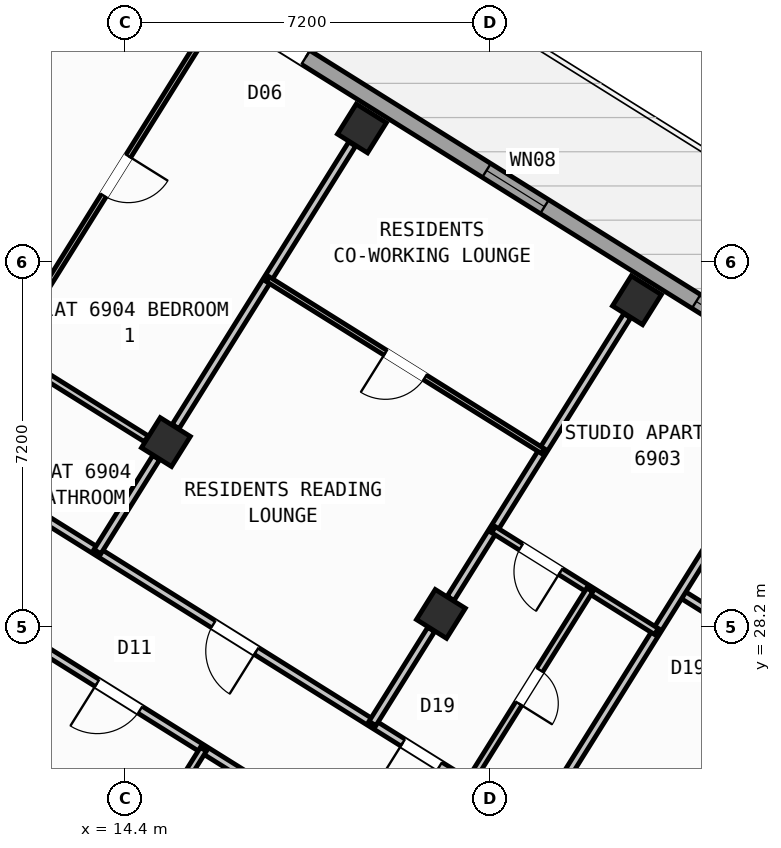
"""IFC4 building model, lengths in metres.
Left out: names, types, materials, properties, quantities, classifications, styles, units other than length and angle.
Written with IfcOpenShell. Run it as: python <this file> out.ifc"""

import sys

from ifc_helpers import new_model, si_unit, direction, frame, frame_2d, origin, origin_2d, place, context, subcontext, project, spatial, rectangle, hollow_rectangle, extrude, source, transform, mapped, element, fill, save


model = new_model("IFC4")
c1 = context("Model", 3, precision=1e-05, world=origin(), true_north=direction((0.0, 1.0)))
c2 = subcontext(c1, "Body", "Model", "MODEL_VIEW")
j1 = project(units=[si_unit("LENGTHUNIT", "METRE"), si_unit("PLANEANGLEUNIT", "RADIAN")], contexts=[c1])
p1 = place(None, origin())
s1 = spatial("IfcSite", under=j1, at=p1, CompositionType="ELEMENT")
p2 = place(p1, origin())
s2 = spatial("IfcBuilding", under=s1, at=p2, CompositionType="ELEMENT")
p3 = place(p2, frame((0.0, 0.0, 273.6)))
s3 = spatial("IfcBuildingStorey", under=s2, at=p3, CompositionType="ELEMENT", Elevation=273.6)
m1 = source(origin(), c2, "Body", "SweptSolid", [
    extrude(hollow_rectangle(XDim=0.7, YDim=0.7, WallThickness=0.028, at=origin_2d()), origin(), (0.0, 0.0, 1.0), 3.6),
])
for number, where, z_axis, x_axis in (
    (1, (24.5, 34.643, 0.0), (0.0, 0.0, 1.0), (-0.848, 0.53, 0.0)),
    (2, (20.632, 28.452, 0.0), (0.0, 0.0, 1.0), (-0.848, 0.53, 0.0)),
    (3, (19.073, 38.034, 0.0), (0.0, 0.0, 1.0), (-0.848, 0.53, 0.0)),
    (4, (15.205, 31.844, 0.0), (0.0, 0.0, 1.0), (-0.848, 0.53, 0.0)),
):
    element("IfcColumn", number, at=place(p3, frame(where, z_axis=z_axis, x_axis=x_axis)), inside=s3, PredefinedType="COLUMN", context=c2, shape_type="MappedRepresentation", body=[
        mapped(m1, transform((0.0, 0.0, 0.0), scale=1.0)),
    ])
p4 = place(p3, frame((2.415, 23.452, 0.0), z_axis=(0.0, 0.0, 1.0), x_axis=(0.52991049553, 0.848053575387, 0.0)))
e5 = element("IfcWall", 5, at=p4, inside=s3, PredefinedType="STANDARD", context=c2, shape_type="SweptSolid", body=[
    extrude(rectangle(XDim=21.587, YDim=0.32, at=frame_2d((10.794, 0.0))), origin(), (0.0, 0.0, 1.0), 2.875),
])
p5 = place(p4, frame((2.606, 0.0, 0.9)))
e6 = element("IfcOpeningElement", 6, at=p5, cuts=e5, PredefinedType="OPENING", context=c2, shape_type="SweptSolid", body=[
    extrude(rectangle(XDim=1.65, YDim=1.45, at=frame_2d((0.825, 0.725))), frame((0.0, 0.17, 0.0), z_axis=(0.0, -1.0, 0.0), x_axis=(1.0, 0.0, 0.0)), (0.0, 0.0, 1.0), 0.34),
])
p6 = place(p4, frame((7.504, 0.0, 1.0)))
e7 = element("IfcOpeningElement", 7, at=p6, cuts=e5, PredefinedType="OPENING", context=c2, shape_type="SweptSolid", body=[
    extrude(rectangle(XDim=0.9, YDim=1.25, at=frame_2d((0.45, 0.625))), frame((0.0, 0.17, 0.0), z_axis=(0.0, -1.0, 0.0), x_axis=(1.0, 0.0, 0.0)), (0.0, 0.0, 1.0), 0.34),
])
p7 = place(p4, frame((12.084, 0.0, 1.0)))
e8 = element("IfcOpeningElement", 8, at=p7, cuts=e5, PredefinedType="OPENING", context=c2, shape_type="SweptSolid", body=[
    extrude(rectangle(XDim=0.9, YDim=1.25, at=frame_2d((0.45, 0.625))), frame((0.0, 0.17, 0.0), z_axis=(0.0, -1.0, 0.0), x_axis=(1.0, 0.0, 0.0)), (0.0, 0.0, 1.0), 0.34),
])
p8 = place(p4, frame((15.619, 0.0, 1.0)))
e9 = element("IfcOpeningElement", 9, at=p8, cuts=e5, PredefinedType="OPENING", context=c2, shape_type="SweptSolid", body=[
    extrude(rectangle(XDim=0.9, YDim=1.25, at=frame_2d((0.45, 0.625))), frame((0.0, 0.17, 0.0), z_axis=(0.0, -1.0, 0.0), x_axis=(1.0, 0.0, 0.0)), (0.0, 0.0, 1.0), 0.34),
])
p9 = place(p4, frame((18.569, 0.0, 1.0)))
e10 = element("IfcOpeningElement", 10, at=p9, cuts=e5, PredefinedType="OPENING", context=c2, shape_type="SweptSolid", body=[
    extrude(rectangle(XDim=0.9, YDim=1.25, at=frame_2d((0.45, 0.625))), frame((0.0, 0.17, 0.0), z_axis=(0.0, -1.0, 0.0), x_axis=(1.0, 0.0, 0.0)), (0.0, 0.0, 1.0), 0.34),
])
p10 = place(p3, frame((14.138, 41.825, 0.0), z_axis=(0.0, 0.0, 1.0), x_axis=(0.848046498049, -0.529921821731, 0.0)))
e11 = element("IfcWall", 11, at=p10, inside=s3, PredefinedType="STANDARD", context=c2, shape_type="SweptSolid", body=[
    extrude(rectangle(XDim=31.588, YDim=0.32, at=frame_2d((15.794, 0.0))), origin(), (0.0, 0.0, 1.0), 3.35),
])
p11 = place(p10, frame((3.46, 0.0, 0.0)))
e12 = element("IfcOpeningElement", 12, at=p11, cuts=e11, PredefinedType="OPENING", context=c2, shape_type="SweptSolid", body=[
    extrude(rectangle(XDim=1.05, YDim=2.15, at=frame_2d((0.525, 1.075))), frame((0.0, 0.17, 0.0), z_axis=(0.0, -1.0, 0.0), x_axis=(1.0, 0.0, 0.0)), (0.0, 0.0, 1.0), 0.34),
])
p12 = place(p10, frame((0.831, 0.0, 1.0)))
e13 = element("IfcOpeningElement", 13, at=p12, cuts=e11, PredefinedType="OPENING", context=c2, shape_type="SweptSolid", body=[
    extrude(rectangle(XDim=0.9, YDim=1.25, at=frame_2d((0.45, 0.625))), frame((0.0, 0.17, 0.0), z_axis=(0.0, -1.0, 0.0), x_axis=(1.0, 0.0, 0.0)), (0.0, 0.0, 1.0), 0.34),
])
p13 = place(p10, frame((8.719, 0.0, 0.9)))
e14 = element("IfcOpeningElement", 14, at=p13, cuts=e11, PredefinedType="OPENING", context=c2, shape_type="SweptSolid", body=[
    extrude(rectangle(XDim=1.35, YDim=1.45, at=frame_2d((0.675, 0.725))), frame((0.0, 0.17, 0.0), z_axis=(0.0, -1.0, 0.0), x_axis=(1.0, 0.0, 0.0)), (0.0, 0.0, 1.0), 0.34),
])
p14 = place(p10, frame((13.599, 0.0, 0.95)))
e15 = element("IfcOpeningElement", 15, at=p14, cuts=e11, PredefinedType="OPENING", context=c2, shape_type="SweptSolid", body=[
    extrude(rectangle(XDim=1.95, YDim=1.35, at=frame_2d((0.975, 0.675))), frame((0.0, 0.17, 0.0), z_axis=(0.0, -1.0, 0.0), x_axis=(1.0, 0.0, 0.0)), (0.0, 0.0, 1.0), 0.34),
])
p15 = place(p10, frame((17.154, 0.0, 1.0)))
e16 = element("IfcOpeningElement", 16, at=p15, cuts=e11, PredefinedType="OPENING", context=c2, shape_type="SweptSolid", body=[
    extrude(rectangle(XDim=0.9, YDim=1.25, at=frame_2d((0.45, 0.625))), frame((0.0, 0.17, 0.0), z_axis=(0.0, -1.0, 0.0), x_axis=(1.0, 0.0, 0.0)), (0.0, 0.0, 1.0), 0.34),
])
p16 = place(p10, frame((21.719, 0.0, 0.9)))
e17 = element("IfcOpeningElement", 17, at=p16, cuts=e11, PredefinedType="OPENING", context=c2, shape_type="SweptSolid", body=[
    extrude(rectangle(XDim=1.65, YDim=1.45, at=frame_2d((0.825, 0.725))), frame((0.0, 0.17, 0.0), z_axis=(0.0, -1.0, 0.0), x_axis=(1.0, 0.0, 0.0)), (0.0, 0.0, 1.0), 0.34),
])
p17 = place(p10, frame((27.419, 0.0, 0.9)))
e18 = element("IfcOpeningElement", 18, at=p17, cuts=e11, PredefinedType="OPENING", context=c2, shape_type="SweptSolid", body=[
    extrude(rectangle(XDim=1.65, YDim=1.45, at=frame_2d((0.825, 0.725))), frame((0.0, 0.17, 0.0), z_axis=(0.0, -1.0, 0.0), x_axis=(1.0, 0.0, 0.0)), (0.0, 0.0, 1.0), 0.34),
])
p18 = place(p3, frame((27.57, 27.478, 0.0), z_axis=(0.0, 0.0, 1.0), x_axis=(-0.848050851465, 0.529914854792, 0.0)))
e19 = element("IfcWall", 19, at=p18, inside=s3, PredefinedType="PARTITIONING", context=c2, shape_type="SweptSolid", body=[
    extrude(rectangle(XDim=2.61, YDim=0.16, at=frame_2d((1.305, 0.0))), origin(), (0.0, 0.0, 1.0), 3.34),
])
p19 = place(p18, frame((0.95, 0.0, 0.0)))
e20 = element("IfcOpeningElement", 20, at=p19, cuts=e19, PredefinedType="OPENING", context=c2, shape_type="SweptSolid", body=[
    extrude(rectangle(XDim=0.86, YDim=2.05, at=frame_2d((0.43, 1.025))), frame((0.0, 0.09, 0.0), z_axis=(0.0, -1.0, 0.0), x_axis=(1.0, 0.0, 0.0)), (0.0, 0.0, 1.0), 0.18),
])
p20 = place(p3, frame((27.953, 33.016, 0.0), z_axis=(0.0, 0.0, 1.0), x_axis=(-0.529909450694, -0.848054228257, 0.0)))
e21 = element("IfcWall", 21, at=p20, inside=s3, PredefinedType="PARTITIONING", context=c2, shape_type="SweptSolid", body=[
    extrude(rectangle(XDim=10.3, YDim=0.16, at=frame_2d((5.15, 0.0))), origin(), (0.0, 0.0, 1.0), 3.34),
])
p21 = place(p3, frame((22.495, 24.281, 0.0), z_axis=(0.0, 0.0, 1.0), x_axis=(-0.848052408131, 0.529912363569, 0.0)))
e22 = element("IfcWall", 22, at=p21, inside=s3, PredefinedType="PARTITIONING", context=c2, shape_type="SweptSolid", body=[
    extrude(rectangle(XDim=16.73, YDim=0.16, at=frame_2d((8.365, 0.0))), origin(), (0.0, 0.0, 1.0), 3.34),
])
p22 = place(p21, frame((2.22, 0.0, 0.0)))
e23 = element("IfcOpeningElement", 23, at=p22, cuts=e22, PredefinedType="OPENING", context=c2, shape_type="SweptSolid", body=[
    extrude(rectangle(XDim=0.86, YDim=2.05, at=frame_2d((0.43, 1.025))), frame((0.0, 0.09, 0.0), z_axis=(0.0, -1.0, 0.0), x_axis=(1.0, 0.0, 0.0)), (0.0, 0.0, 1.0), 0.18),
])
p23 = place(p21, frame((6.49, 0.0, 0.0)))
e24 = element("IfcOpeningElement", 24, at=p23, cuts=e22, PredefinedType="OPENING", context=c2, shape_type="SweptSolid", body=[
    extrude(rectangle(XDim=1.0, YDim=2.1, at=frame_2d((0.5, 1.05))), frame((0.0, 0.09, 0.0), z_axis=(0.0, -1.0, 0.0), x_axis=(1.0, 0.0, 0.0)), (0.0, 0.0, 1.0), 0.18),
])
p24 = place(p21, frame((14.76, 0.0, 0.0)))
e25 = element("IfcOpeningElement", 25, at=p24, cuts=e22, PredefinedType="OPENING", context=c2, shape_type="SweptSolid", body=[
    extrude(rectangle(XDim=1.0, YDim=2.1, at=frame_2d((0.5, 1.05))), frame((0.0, 0.09, 0.0), z_axis=(0.0, -1.0, 0.0), x_axis=(1.0, 0.0, 0.0)), (0.0, 0.0, 1.0), 0.18),
])
p25 = place(p3, frame((21.329, 22.416, 0.0), z_axis=(0.0, 0.0, 1.0), x_axis=(-0.848052408131, 0.529912363569, 0.0)))
e26 = element("IfcWall", 26, at=p25, inside=s3, PredefinedType="PARTITIONING", context=c2, shape_type="SweptSolid", body=[
    extrude(rectangle(XDim=16.73, YDim=0.16, at=frame_2d((8.365, 0.0))), origin(), (0.0, 0.0, 1.0), 3.34),
])
p26 = place(p25, frame((1.395, 0.0, 0.0)))
e27 = element("IfcOpeningElement", 27, at=p26, cuts=e26, PredefinedType="OPENING", context=c2, shape_type="SweptSolid", body=[
    extrude(rectangle(XDim=1.0, YDim=2.1, at=frame_2d((0.5, 1.05))), frame((0.0, 0.09, 0.0), z_axis=(0.0, -1.0, 0.0), x_axis=(1.0, 0.0, 0.0)), (0.0, 0.0, 1.0), 0.18),
])
p27 = place(p25, frame((7.82, 0.0, 0.0)))
e28 = element("IfcOpeningElement", 28, at=p27, cuts=e26, PredefinedType="OPENING", context=c2, shape_type="SweptSolid", body=[
    extrude(rectangle(XDim=1.0, YDim=2.1, at=frame_2d((0.5, 1.05))), frame((0.0, 0.09, 0.0), z_axis=(0.0, -1.0, 0.0), x_axis=(1.0, 0.0, 0.0)), (0.0, 0.0, 1.0), 0.18),
])
p28 = place(p25, frame((11.14, 0.0, 0.0)))
e29 = element("IfcOpeningElement", 29, at=p28, cuts=e26, PredefinedType="OPENING", context=c2, shape_type="SweptSolid", body=[
    extrude(rectangle(XDim=1.0, YDim=2.1, at=frame_2d((0.5, 1.05))), frame((0.0, 0.09, 0.0), z_axis=(0.0, -1.0, 0.0), x_axis=(1.0, 0.0, 0.0)), (0.0, 0.0, 1.0), 0.18),
])
p29 = place(p3, frame((15.944, 25.781, 0.0), z_axis=(0.0, 0.0, 1.0), x_axis=(-0.529917480809, -0.848049210561, 0.0)))
e30 = element("IfcWall", 30, at=p29, inside=s3, PredefinedType="PLUMBINGWALL", context=c2, shape_type="SweptSolid", body=[
    extrude(rectangle(XDim=4.58, YDim=0.14, at=frame_2d((2.29, 0.0))), origin(), (0.0, 0.0, 1.0), 3.34),
])
p30 = place(p29, frame((1.9, 0.0, 0.0)))
e31 = element("IfcOpeningElement", 31, at=p30, cuts=e30, PredefinedType="OPENING", context=c2, shape_type="SweptSolid", body=[
    extrude(rectangle(XDim=0.78, YDim=2.05, at=frame_2d((0.39, 1.025))), frame((0.0, 0.08, 0.0), z_axis=(0.0, -1.0, 0.0), x_axis=(1.0, 0.0, 0.0)), (0.0, 0.0, 1.0), 0.16),
])
p31 = place(p3, frame((24.309, 34.336, 0.0), z_axis=(0.0, 0.0, 1.0), x_axis=(-0.529895484599, -0.848062954858, 0.0)))
e32 = element("IfcWall", 32, at=p31, inside=s3, PredefinedType="PARTITIONING", context=c2, shape_type="SweptSolid", body=[
    extrude(rectangle(XDim=6.576, YDim=0.16, at=frame_2d((3.288, 0.0))), origin(), (0.0, 0.0, 1.0), 2.875),
])
p32 = place(p3, frame((20.44, 28.145, 0.0), z_axis=(0.0, 0.0, 1.0), x_axis=(-0.5299186965, -0.848048450915, 0.0)))
e33 = element("IfcWall", 33, at=p32, inside=s3, PredefinedType="PARTITIONING", context=c2, shape_type="SweptSolid", body=[
    extrude(rectangle(XDim=2.188, YDim=0.16, at=frame_2d((1.094, 0.0))), origin(), (0.0, 0.0, 1.0), 2.875),
])
p33 = place(p3, frame((24.885, 28.106, 0.0), z_axis=(0.0, 0.0, 1.0), x_axis=(-0.848059820872, 0.529900500304, 0.0)))
e34 = element("IfcWall", 34, at=p33, inside=s3, PredefinedType="PLUMBINGWALL", context=c2, shape_type="SweptSolid", body=[
    extrude(rectangle(XDim=3.79, YDim=0.14, at=frame_2d((1.895, 0.0))), origin(), (0.0, 0.0, 1.0), 3.34),
])
p34 = place(p33, frame((2.23, 0.0, 0.0)))
e35 = element("IfcOpeningElement", 35, at=p34, cuts=e34, PredefinedType="OPENING", context=c2, shape_type="SweptSolid", body=[
    extrude(rectangle(XDim=0.92, YDim=2.08, at=frame_2d((0.46, 1.04))), frame((0.0, 0.08, 0.0), z_axis=(0.0, -1.0, 0.0), x_axis=(1.0, 0.0, 0.0)), (0.0, 0.0, 1.0), 0.16),
])
p35 = place(p3, frame((23.57, 28.927, 0.0), z_axis=(0.0, 0.0, 1.0), x_axis=(-0.529911350634, -0.84805304107, 0.0)))
e36 = element("IfcWall", 36, at=p35, inside=s3, PredefinedType="PLUMBINGWALL", context=c2, shape_type="SweptSolid", body=[
    extrude(rectangle(XDim=4.51, YDim=0.14, at=frame_2d((2.255, 0.0))), origin(), (0.0, 0.0, 1.0), 3.025),
])
p36 = place(p35, frame((1.865, 0.0, 0.0)))
e37 = element("IfcOpeningElement", 37, at=p36, cuts=e36, PredefinedType="OPENING", context=c2, shape_type="SweptSolid", body=[
    extrude(rectangle(XDim=0.78, YDim=2.05, at=frame_2d((0.39, 1.025))), frame((0.0, 0.08, 0.0), z_axis=(0.0, -1.0, 0.0), x_axis=(1.0, 0.0, 0.0)), (0.0, 0.0, 1.0), 0.16),
])
p37 = place(p3, frame((18.881, 37.727, 0.0), z_axis=(0.0, 0.0, 1.0), x_axis=(-0.529938869374, -0.84803584519, 0.0)))
e38 = element("IfcWall", 38, at=p37, inside=s3, PredefinedType="PARTITIONING", context=c2, shape_type="SweptSolid", body=[
    extrude(rectangle(XDim=6.576, YDim=0.16, at=frame_2d((3.288, 0.0))), origin(), (0.0, 0.0, 1.0), 2.875),
])
p38 = place(p3, frame((15.013, 31.537, 0.0), z_axis=(0.0, 0.0, 1.0), x_axis=(-0.5299186965, -0.848048450915, 0.0)))
e39 = element("IfcWall", 39, at=p38, inside=s3, PredefinedType="PARTITIONING", context=c2, shape_type="SweptSolid", body=[
    extrude(rectangle(XDim=2.188, YDim=0.16, at=frame_2d((1.094, 0.0))), origin(), (0.0, 0.0, 1.0), 2.875),
])
p39 = place(p3, frame((22.642, 31.668, 0.0), z_axis=(0.0, 0.0, 1.0), x_axis=(-0.84806687439, 0.529889211593, 0.0)))
e40 = element("IfcWall", 40, at=p39, inside=s3, PredefinedType="PARTITIONING", context=c2, shape_type="SweptSolid", body=[
    extrude(rectangle(XDim=6.4, YDim=0.11, at=frame_2d((3.2, 0.0))), origin(), (0.0, 0.0, 1.0), 3.34),
])
p40 = place(p39, frame((2.74, 0.0, 0.0)))
e41 = element("IfcOpeningElement", 41, at=p40, cuts=e40, PredefinedType="OPENING", context=c2, shape_type="SweptSolid", body=[
    extrude(rectangle(XDim=0.92, YDim=2.08, at=frame_2d((0.46, 1.04))), frame((0.0, 0.065, 0.0), z_axis=(0.0, -1.0, 0.0), x_axis=(1.0, 0.0, 0.0)), (0.0, 0.0, 1.0), 0.13),
])
p41 = place(p3, frame((16.385, 40.563, 0.0), z_axis=(0.0, 0.0, 1.0), x_axis=(-0.529924195719, -0.848045014602, 0.0)))
e42 = element("IfcWall", 42, at=p41, inside=s3, PredefinedType="PARTITIONING", context=c2, shape_type="SweptSolid", body=[
    extrude(rectangle(XDim=10.57, YDim=0.11, at=frame_2d((5.285, 0.0))), origin(), (0.0, 0.0, 1.0), 3.34),
])
p42 = place(p41, frame((8.93, 0.0, 0.0)))
e43 = element("IfcOpeningElement", 43, at=p42, cuts=e42, PredefinedType="OPENING", context=c2, shape_type="SweptSolid", body=[
    extrude(rectangle(XDim=0.78, YDim=2.05, at=frame_2d((0.39, 1.025))), frame((0.0, 0.065, 0.0), z_axis=(0.0, -1.0, 0.0), x_axis=(1.0, 0.0, 0.0)), (0.0, 0.0, 1.0), 0.13),
])
p43 = place(p41, frame((3.625, 0.0, 0.0)))
e44 = element("IfcOpeningElement", 44, at=p43, cuts=e42, PredefinedType="OPENING", context=c2, shape_type="SweptSolid", body=[
    extrude(rectangle(XDim=0.92, YDim=2.08, at=frame_2d((0.46, 1.04))), frame((0.0, 0.065, 0.0), z_axis=(0.0, -1.0, 0.0), x_axis=(1.0, 0.0, 0.0)), (0.0, 0.0, 1.0), 0.13),
])
p44 = place(p3, frame((14.818, 31.908, 0.0), z_axis=(0.0, 0.0, 1.0), x_axis=(-0.848036190178, 0.529938317305, 0.0)))
e45 = element("IfcWall", 45, at=p44, inside=s3, PredefinedType="PLUMBINGWALL", context=c2, shape_type="SweptSolid", body=[
    extrude(rectangle(XDim=3.258, YDim=0.14, at=frame_2d((1.629, 0.0))), origin(), (0.0, 0.0, 1.0), 2.875),
])
m2 = source(origin(), c2, "Body", "SweptSolid", [
    extrude(rectangle(XDim=1.05, YDim=2.15, at=frame_2d((0.525, 1.075))), frame((0.0, 0.025, 0.0), z_axis=(0.0, -1.0, 0.0), x_axis=(1.0, 0.0, 0.0)), (0.0, 0.0, 1.0), 0.05),
])
p45 = place(p11, origin())
e46 = element("IfcDoor", 46, at=p45, inside=s3, OperationType="SINGLE_SWING_RIGHT", PredefinedType="DOOR", context=c2, shape_type="MappedRepresentation", body=[
    mapped(m2, transform((0.0, 0.0, 0.0), scale=1.0)),
])
fill(e12, e46)
m3 = source(origin(), c2, "Body", "SweptSolid", [
    extrude(rectangle(XDim=1.35, YDim=1.45, at=frame_2d((0.675, 0.725))), frame((0.0, 0.03, 0.0), z_axis=(0.0, -1.0, 0.0), x_axis=(1.0, 0.0, 0.0)), (0.0, 0.0, 1.0), 0.06),
])
p46 = place(p13, origin())
e47 = element("IfcWindow", 47, at=p46, inside=s3, PartitioningType="SINGLE_PANEL", PredefinedType="WINDOW", context=c2, shape_type="MappedRepresentation", body=[
    mapped(m3, transform((0.0, 0.0, 0.0), scale=1.0)),
])
fill(e14, e47)
m4 = source(origin(), c2, "Body", "SweptSolid", [
    extrude(rectangle(XDim=1.95, YDim=1.35, at=frame_2d((0.975, 0.675))), frame((0.0, 0.03, 0.0), z_axis=(0.0, -1.0, 0.0), x_axis=(1.0, 0.0, 0.0)), (0.0, 0.0, 1.0), 0.06),
])
p47 = place(p14, origin())
e48 = element("IfcWindow", 48, at=p47, inside=s3, PartitioningType="SINGLE_PANEL", PredefinedType="WINDOW", context=c2, shape_type="MappedRepresentation", body=[
    mapped(m4, transform((0.0, 0.0, 0.0), scale=1.0)),
])
fill(e15, e48)
m5 = source(origin(), c2, "Body", "SweptSolid", [
    extrude(rectangle(XDim=1.0, YDim=2.1, at=frame_2d((0.5, 1.05))), frame((0.0, 0.025, 0.0), z_axis=(0.0, -1.0, 0.0), x_axis=(1.0, 0.0, 0.0)), (0.0, 0.0, 1.0), 0.05),
])
p48 = place(p27, origin())
e49 = element("IfcDoor", 49, at=p48, inside=s3, OperationType="SINGLE_SWING_RIGHT", PredefinedType="DOOR", context=c2, shape_type="MappedRepresentation", body=[
    mapped(m5, transform((0.0, 0.0, 0.0), scale=1.0)),
])
fill(e28, e49)
m6 = source(origin(), c2, "Body", "SweptSolid", [
    extrude(rectangle(XDim=0.86, YDim=2.05, at=frame_2d((0.43, 1.025))), frame((0.0, 0.025, 0.0), z_axis=(0.0, -1.0, 0.0), x_axis=(1.0, 0.0, 0.0)), (0.0, 0.0, 1.0), 0.05),
])
p49 = place(p22, origin())
e50 = element("IfcDoor", 50, at=p49, inside=s3, OperationType="SINGLE_SWING_RIGHT", PredefinedType="DOOR", context=c2, shape_type="MappedRepresentation", body=[
    mapped(m6, transform((0.0, 0.0, 0.0), scale=1.0)),
])
fill(e23, e50)
m7 = source(origin(), c2, "Body", "SweptSolid", [
    extrude(rectangle(XDim=0.92, YDim=2.08, at=frame_2d((0.46, 1.04))), frame((0.0, 0.025, 0.0), z_axis=(0.0, -1.0, 0.0), x_axis=(1.0, 0.0, 0.0)), (0.0, 0.0, 1.0), 0.05),
])
p50 = place(p34, origin())
e51 = element("IfcDoor", 51, at=p50, inside=s3, OperationType="SINGLE_SWING_LEFT", PredefinedType="DOOR", context=c2, shape_type="MappedRepresentation", body=[
    mapped(m7, transform((0.0, 0.0, 0.0), scale=1.0)),
])
fill(e35, e51)
m8 = source(origin(), c2, "Body", "SweptSolid", [
    extrude(rectangle(XDim=0.78, YDim=2.05, at=frame_2d((0.39, 1.025))), frame((0.0, 0.025, 0.0), z_axis=(0.0, -1.0, 0.0), x_axis=(1.0, 0.0, 0.0)), (0.0, 0.0, 1.0), 0.05),
])
p51 = place(p36, origin())
e52 = element("IfcDoor", 52, at=p51, inside=s3, OperationType="SINGLE_SWING_RIGHT", PredefinedType="DOOR", context=c2, shape_type="MappedRepresentation", body=[
    mapped(m8, transform((0.0, 0.0, 0.0), scale=1.0)),
])
fill(e37, e52)
p52 = place(p23, origin())
e53 = element("IfcDoor", 53, at=p52, inside=s3, OperationType="SINGLE_SWING_LEFT", PredefinedType="DOOR", context=c2, shape_type="MappedRepresentation", body=[
    mapped(m5, transform((0.0, 0.0, 0.0), scale=1.0)),
])
fill(e24, e53)
p53 = place(p40, origin())
e54 = element("IfcDoor", 54, at=p53, inside=s3, OperationType="SINGLE_SWING_RIGHT", PredefinedType="DOOR", context=c2, shape_type="MappedRepresentation", body=[
    mapped(m7, transform((0.0, 0.0, 0.0), scale=1.0)),
])
fill(e41, e54)
p54 = place(p43, origin())
e55 = element("IfcDoor", 55, at=p54, inside=s3, OperationType="SINGLE_SWING_LEFT", PredefinedType="DOOR", context=c2, shape_type="MappedRepresentation", body=[
    mapped(m7, transform((0.0, 0.0, 0.0), scale=1.0)),
])
fill(e44, e55)
save(model, sys.argv[1])
